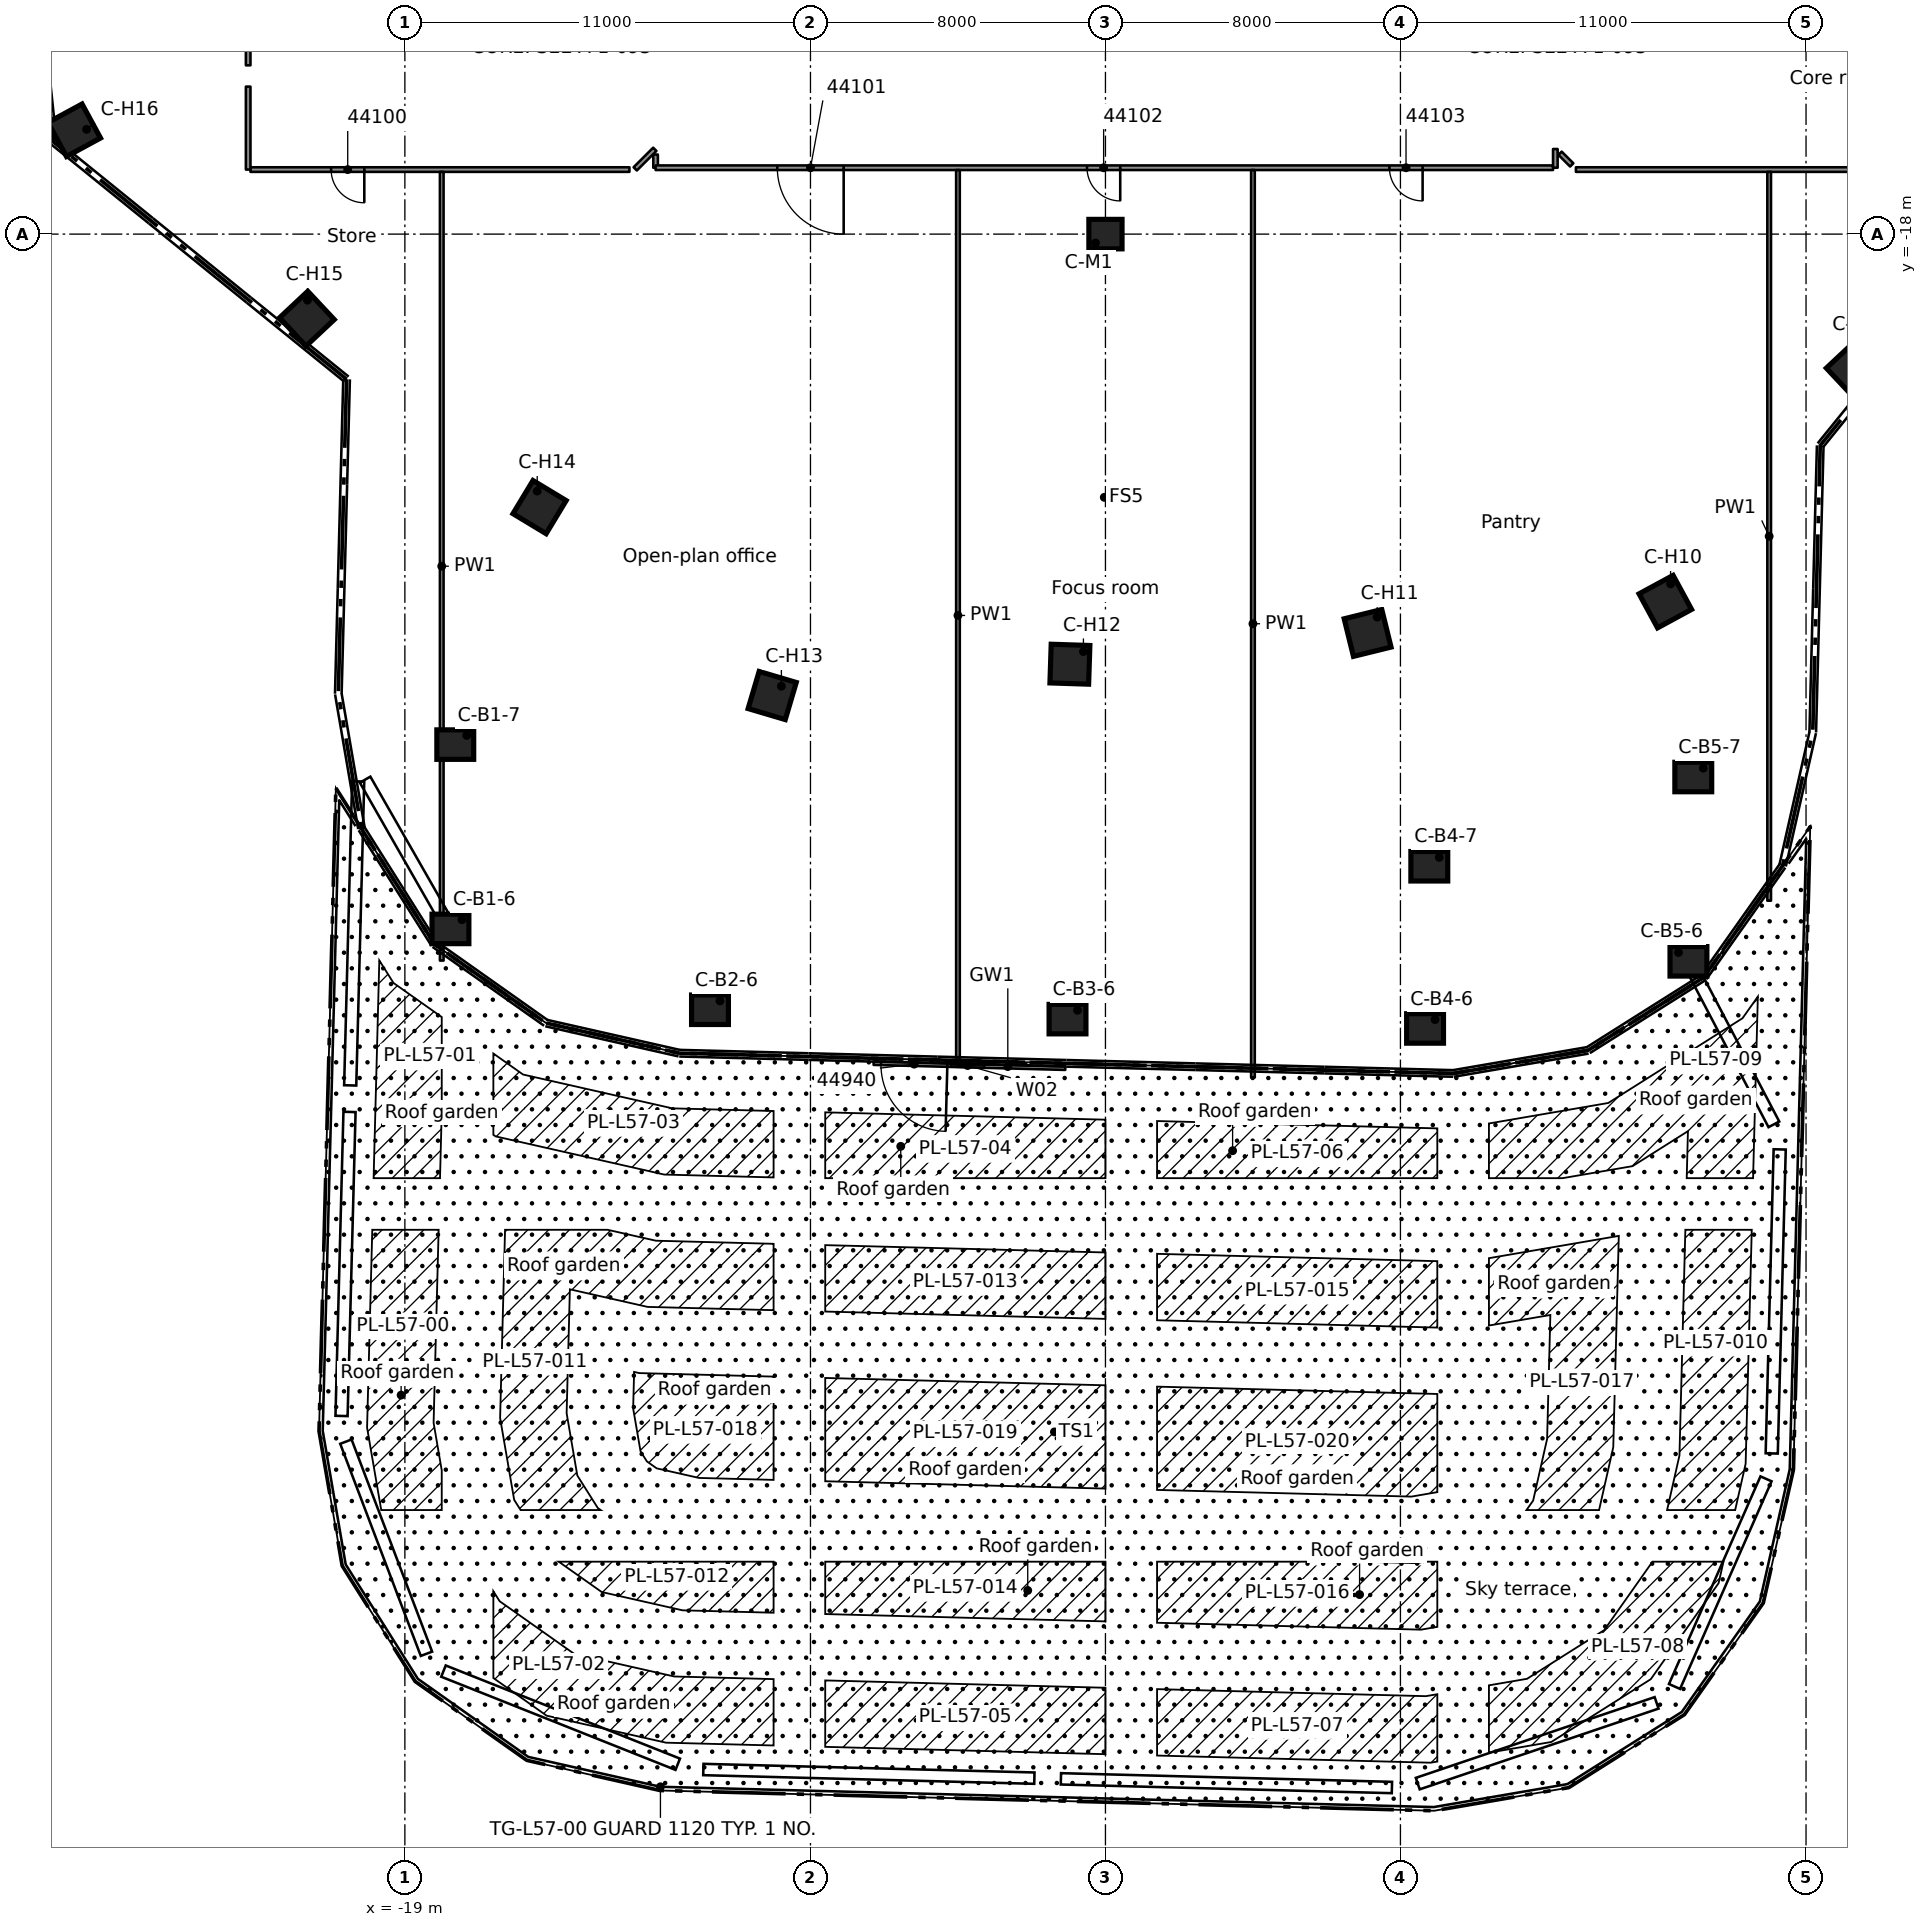
"""IFC4 building model, lengths in metres.
Left out: names, types, materials, properties, quantities, classifications, styles, units other than length and angle.
Written with IfcOpenShell. Run it as: python <this file> out.ifc"""

import sys

from ifc_helpers import new_model, si_unit, direction, frame, frame_2d, origin, origin_2d, place, context, subcontext, project, spatial, rectangle, extrude, element, fill, save


model = new_model("IFC4")
c1 = context("Model", 3, precision=1e-05, world=origin(), true_north=direction((0.0, 1.0)))
c2 = subcontext(c1, "Body", "Model", "MODEL_VIEW")
j1 = project(units=[si_unit("LENGTHUNIT", "METRE"), si_unit("PLANEANGLEUNIT", "RADIAN")], contexts=[c1])
p1 = place(None, origin())
s1 = spatial("IfcSite", under=j1, at=p1, CompositionType="ELEMENT")
p2 = place(p1, origin())
s2 = spatial("IfcBuilding", under=s1, at=p2, CompositionType="ELEMENT")
p3 = place(p2, frame((0.0, 0.0, 217.5)))
s3 = spatial("IfcBuildingStorey", under=s2, at=p3, CompositionType="ELEMENT", Elevation=217.5)
for number, where, z_axis, x_axis in (
    (1, (-17.764, -36.841, 0.0), (0.0, 0.0, 1.0), (1.0, 0.0, 0.0)),
    (2, (-17.633, -31.843, 0.0), (0.0, 0.0, 1.0), (1.0, 0.0, 0.0)),
    (3, (-10.725, -39.033, 0.0), (0.0, 0.0, 1.0), (1.0, 0.0, 0.0)),
    (4, (-1.029, -39.287, 0.0), (0.0, 0.0, 1.0), (1.0, 0.0, 0.0)),
    (5, (8.668, -39.54, 0.0), (0.0, 0.0, 1.0), (1.0, 0.0, 0.0)),
    (6, (8.783, -35.142, 0.0), (0.0, 0.0, 1.0), (1.0, 0.0, 0.0)),
    (7, (15.811, -37.72, 0.0), (0.0, 0.0, 1.0), (1.0, 0.0, 0.0)),
    (8, (15.942, -32.722, 0.0), (0.0, 0.0, 1.0), (1.0, 0.0, 0.0)),
):
    element("IfcColumn", number, at=place(p3, frame(where, z_axis=z_axis, x_axis=x_axis)), inside=s3, PredefinedType="COLUMN", context=c2, shape_type="SweptSolid", body=[
        extrude(rectangle(XDim=1.0, YDim=0.8, at=origin_2d()), origin(), (0.0, 0.0, 1.0), 3.5),
    ])
for number, where, z_axis, x_axis in (
    (9, (20.293, -21.657, 0.0), (0.0, 0.0, 1.0), (0.684, -0.73, 0.0)),
    (10, (15.184, -27.966, 0.0), (0.0, 0.0, 1.0), (0.477, -0.879, 0.0)),
    (11, (7.11, -28.815, 0.0), (0.0, 0.0, 1.0), (0.24, -0.971, 0.0)),
    (12, (-0.964, -29.663, 0.0), (0.0, 0.0, 1.0), (-0.032, -0.999, 0.0)),
    (13, (-9.038, -30.512, 0.0), (0.0, 0.0, 1.0), (-0.284, -0.959, 0.0)),
    (14, (-15.347, -25.403, 0.0), (0.0, 0.0, 1.0), (-0.517, -0.856, 0.0)),
    (15, (-21.657, -20.293, 0.0), (0.0, 0.0, 1.0), (-0.73, -0.684, 0.0)),
    (16, (-27.966, -15.184, 0.0), (0.0, 0.0, 1.0), (-0.879, -0.477, 0.0)),
):
    element("IfcColumn", number, at=place(p3, frame(where, z_axis=z_axis, x_axis=x_axis)), inside=s3, PredefinedType="COLUMN", context=c2, shape_type="SweptSolid", body=[
        extrude(rectangle(XDim=1.05, YDim=1.05, at=origin_2d()), origin(), (0.0, 0.0, 1.0), 3.5),
    ])
p4 = place(p3, frame((0.0, -18.0, 0.0), z_axis=(0.0, 0.0, 1.0), x_axis=(1.0, 0.0, 0.0)))
e17 = element("IfcColumn", 17, at=p4, inside=s3, PredefinedType="COLUMN", context=c2, shape_type="SweptSolid", body=[
    extrude(rectangle(XDim=0.9, YDim=0.8, at=origin_2d()), origin(), (0.0, 0.0, 1.0), 3.5),
])
p5 = place(p3, frame((-1.089, -40.615, 0.0), z_axis=(0.0, 0.0, 1.0), x_axis=(-0.99965677268, 0.026198031146, 0.0)))
e18 = element("IfcWall", 18, at=p5, inside=s3, PredefinedType="STANDARD", context=c2, shape_type="SweptSolid", body=[
    extrude(rectangle(XDim=5.2, YDim=0.1, at=frame_2d((2.6, 0.0))), origin(), (0.0, 0.0, 1.0), 3.08),
])
p6 = place(p5, frame((3.2, 0.0, 0.0)))
e19 = element("IfcOpeningElement", 19, at=p6, cuts=e18, PredefinedType="OPENING", context=c2, shape_type="SweptSolid", body=[
    extrude(rectangle(XDim=1.8, YDim=2.4, at=frame_2d((0.9, 1.2))), frame((0.0, 0.06, 0.0), z_axis=(0.0, -1.0, 0.0), x_axis=(1.0, 0.0, 0.0)), (0.0, 0.0, 1.0), 0.12),
])
p7 = place(p5, frame((2.2, 0.0, 0.0)))
e20 = element("IfcOpeningElement", 20, at=p7, cuts=e18, PredefinedType="OPENING", context=c2, shape_type="SweptSolid", body=[
    extrude(rectangle(XDim=0.9, YDim=2.4, at=frame_2d((0.45, 1.2))), frame((0.0, 0.06, 0.0), z_axis=(0.0, -1.0, 0.0), x_axis=(1.0, 0.0, 0.0)), (0.0, 0.0, 1.0), 0.12),
])
p8 = place(p3, frame((-12.201, -15.842, 0.0), z_axis=(0.0, 0.0, 1.0), x_axis=(0.002728502804, -0.999996277629, 0.0)))
e21 = element("IfcWall", 21, at=p8, inside=s3, PredefinedType="PARTITIONING", context=c2, shape_type="SweptSolid", body=[
    extrude(rectangle(XDim=0.358, YDim=0.125, at=frame_2d((0.179, 0.0))), origin(), (0.0, 0.0, 1.0), 3.06),
])
p9 = place(p3, frame((12.329, -15.807, 0.0), z_axis=(0.0, 0.0, 1.0), x_axis=(0.706834450471, -0.707379007059, 0.0)))
e22 = element("IfcWall", 22, at=p9, inside=s3, PredefinedType="PARTITIONING", context=c2, shape_type="SweptSolid", body=[
    extrude(rectangle(XDim=0.448, YDim=0.125, at=frame_2d((0.224, 0.0))), origin(), (0.0, 0.0, 1.0), 3.06),
])
p10 = place(p3, frame((-12.91, -16.25, 0.0), z_axis=(0.0, 0.0, 1.0), x_axis=(-1.0, 0.0, 0.0)))
e23 = element("IfcWall", 23, at=p10, inside=s3, PredefinedType="PARTITIONING", context=c2, shape_type="SweptSolid", body=[
    extrude(rectangle(XDim=10.278, YDim=0.125, at=frame_2d((5.139, 0.0))), origin(), (0.0, 0.0, 1.0), 3.06),
])
p11 = place(p10, frame((7.19, 0.0, 0.0)))
e24 = element("IfcOpeningElement", 24, at=p11, cuts=e23, PredefinedType="OPENING", context=c2, shape_type="SweptSolid", body=[
    extrude(rectangle(XDim=0.9, YDim=2.1, at=frame_2d((0.45, 1.05))), frame((0.0, 0.073, 0.0), z_axis=(0.0, -1.0, 0.0), x_axis=(1.0, 0.0, 0.0)), (0.0, 0.0, 1.0), 0.145),
])
p12 = place(p3, frame((12.759, -16.25, 0.0), z_axis=(0.0, 0.0, 1.0), x_axis=(1.0, 0.0, 0.0)))
e25 = element("IfcWall", 25, at=p12, inside=s3, PredefinedType="PARTITIONING", context=c2, shape_type="SweptSolid", body=[
    extrude(rectangle(XDim=9.874, YDim=0.125, at=frame_2d((4.937, 0.0))), origin(), (0.0, 0.0, 1.0), 3.06),
])
p13 = place(p3, frame((12.139, -16.2, 0.0), z_axis=(0.0, 0.0, 1.0), x_axis=(-1.0, 0.0, 0.0)))
e26 = element("IfcWall", 26, at=p13, inside=s3, PredefinedType="PARTITIONING", context=c2, shape_type="SweptSolid", body=[
    extrude(rectangle(XDim=24.339, YDim=0.125, at=frame_2d((12.169, 0.0))), origin(), (0.0, 0.0, 1.0), 3.06),
])
p14 = place(p13, frame((19.239, 0.0, 0.0)))
e27 = element("IfcOpeningElement", 27, at=p14, cuts=e26, PredefinedType="OPENING", context=c2, shape_type="SweptSolid", body=[
    extrude(rectangle(XDim=1.8, YDim=2.1, at=frame_2d((0.9, 1.05))), frame((0.0, 0.073, 0.0), z_axis=(0.0, -1.0, 0.0), x_axis=(1.0, 0.0, 0.0)), (0.0, 0.0, 1.0), 0.145),
])
p15 = place(p13, frame((11.739, 0.0, 0.0)))
e28 = element("IfcOpeningElement", 28, at=p15, cuts=e26, PredefinedType="OPENING", context=c2, shape_type="SweptSolid", body=[
    extrude(rectangle(XDim=0.9, YDim=2.1, at=frame_2d((0.45, 1.05))), frame((0.0, 0.073, 0.0), z_axis=(0.0, -1.0, 0.0), x_axis=(1.0, 0.0, 0.0)), (0.0, 0.0, 1.0), 0.145),
])
p16 = place(p13, frame((3.538, 0.0, 0.0)))
e29 = element("IfcOpeningElement", 29, at=p16, cuts=e26, PredefinedType="OPENING", context=c2, shape_type="SweptSolid", body=[
    extrude(rectangle(XDim=0.9, YDim=2.1, at=frame_2d((0.45, 1.05))), frame((0.0, 0.073, 0.0), z_axis=(0.0, -1.0, 0.0), x_axis=(1.0, 0.0, 0.0)), (0.0, 0.0, 1.0), 0.145),
])
p17 = place(p3, frame((-12.753, -16.231, 0.0), z_axis=(0.0, 0.0, 1.0), x_axis=(0.707106781187, 0.707106781187, 0.0)))
e30 = element("IfcWall", 30, at=p17, inside=s3, PredefinedType="PARTITIONING", context=c2, shape_type="SweptSolid", body=[
    extrude(rectangle(XDim=0.751, YDim=0.125, at=frame_2d((0.375, 0.0))), origin(), (0.0, 0.0, 1.0), 3.06),
])
p18 = place(p3, frame((18.0, -36.076, 0.0), z_axis=(0.0, 0.0, 1.0), x_axis=(0.0, 1.0, 0.0)))
e31 = element("IfcWall", 31, at=p18, inside=s3, PredefinedType="PARTITIONING", context=c2, shape_type="SweptSolid", body=[
    extrude(rectangle(XDim=19.764, YDim=0.1, at=frame_2d((9.882, 0.0))), origin(), (0.0, 0.0, 1.0), 3.06),
])
p19 = place(p3, frame((12.201, -16.2, 0.0), z_axis=(0.0, 0.0, 1.0), x_axis=(0.0, 1.0, 0.0)))
e32 = element("IfcWall", 32, at=p19, inside=s3, PredefinedType="PARTITIONING", context=c2, shape_type="SweptSolid", body=[
    extrude(rectangle(XDim=0.508, YDim=0.125, at=frame_2d((0.254, 0.0))), origin(), (0.0, 0.0, 1.0), 3.06),
])
p20 = place(p3, frame((4.0, -40.869, 0.0), z_axis=(0.0, 0.0, 1.0), x_axis=(0.0, 1.0, 0.0)))
e33 = element("IfcWall", 33, at=p20, inside=s3, PredefinedType="PARTITIONING", context=c2, shape_type="SweptSolid", body=[
    extrude(rectangle(XDim=24.607, YDim=0.1, at=frame_2d((12.303, 0.0))), origin(), (0.0, 0.0, 1.0), 3.06),
])
p21 = place(p3, frame((-4.0, -40.419, 0.0), z_axis=(0.0, 0.0, 1.0), x_axis=(0.0, 1.0, 0.0)))
e34 = element("IfcWall", 34, at=p21, inside=s3, PredefinedType="PARTITIONING", context=c2, shape_type="SweptSolid", body=[
    extrude(rectangle(XDim=24.157, YDim=0.1, at=frame_2d((12.079, 0.0))), origin(), (0.0, 0.0, 1.0), 3.06),
])
p22 = place(p3, frame((-18.0, -37.7, 0.0), z_axis=(0.0, 0.0, 1.0), x_axis=(0.0, 1.0, 0.0)))
e35 = element("IfcWall", 35, at=p22, inside=s3, PredefinedType="PARTITIONING", context=c2, shape_type="SweptSolid", body=[
    extrude(rectangle(XDim=21.388, YDim=0.1, at=frame_2d((10.694, 0.0))), origin(), (0.0, 0.0, 1.0), 3.06),
])
p23 = place(p3, frame((-23.25, -16.25, 0.0), z_axis=(0.0, 0.0, 1.0), x_axis=(0.0, 1.0, 0.0)))
e36 = element("IfcWall", 36, at=p23, inside=s3, PredefinedType="PARTITIONING", context=c2, shape_type="SweptSolid", body=[
    extrude(rectangle(XDim=2.25, YDim=0.125, at=frame_2d((1.125, 0.0))), origin(), (0.0, 0.0, 1.0), 3.06),
])
p24 = place(p3, frame((-23.25, -13.423, 0.0), z_axis=(0.0, 0.0, 1.0), x_axis=(0.0, 1.0, 0.0)))
e37 = element("IfcWall", 37, at=p24, inside=s3, PredefinedType="PARTITIONING", context=c2, shape_type="SweptSolid", body=[
    extrude(rectangle(XDim=28.805, YDim=0.125, at=frame_2d((14.403, 0.0))), origin(), (0.0, 0.0, 1.0), 3.06),
])
p25 = place(p24, frame((9.6, 0.0, 0.0)))
e38 = element("IfcOpeningElement", 38, at=p25, cuts=e37, PredefinedType="OPENING", context=c2, shape_type="SweptSolid", body=[
    extrude(rectangle(XDim=1.8, YDim=2.1, at=frame_2d((0.9, 1.05))), frame((0.0, 0.073, 0.0), z_axis=(0.0, -1.0, 0.0), x_axis=(1.0, 0.0, 0.0)), (0.0, 0.0, 1.0), 0.145),
])
p26 = place(p24, frame((23.696, 0.0, 0.0)))
e39 = element("IfcOpeningElement", 39, at=p26, cuts=e37, PredefinedType="OPENING", context=c2, shape_type="SweptSolid", body=[
    extrude(rectangle(XDim=1.1, YDim=2.1, at=frame_2d((0.55, 1.05))), frame((0.0, 0.073, 0.0), z_axis=(0.0, -1.0, 0.0), x_axis=(1.0, 0.0, 0.0)), (0.0, 0.0, 1.0), 0.145),
])
p27 = place(p6, origin())
e40 = element("IfcDoor", 40, at=p27, inside=s3, OperationType="DOUBLE_DOOR_SINGLE_SWING", PredefinedType="DOOR", context=c2, shape_type="SweptSolid", body=[
    extrude(rectangle(XDim=1.8, YDim=2.4, at=frame_2d((0.9, 1.2))), frame((0.0, 0.025, 0.0), z_axis=(0.0, -1.0, 0.0), x_axis=(1.0, 0.0, 0.0)), (0.0, 0.0, 1.0), 0.05),
])
fill(e19, e40)
p28 = place(p7, origin())
e41 = element("IfcWindow", 41, at=p28, inside=s3, PartitioningType="SINGLE_PANEL", PredefinedType="WINDOW", context=c2, shape_type="SweptSolid", body=[
    extrude(rectangle(XDim=0.9, YDim=2.4, at=frame_2d((0.45, 1.2))), frame((0.0, 0.03, 0.0), z_axis=(0.0, -1.0, 0.0), x_axis=(1.0, 0.0, 0.0)), (0.0, 0.0, 1.0), 0.06),
])
fill(e20, e41)
p29 = place(p11, origin())
e42 = element("IfcDoor", 42, at=p29, inside=s3, OperationType="SINGLE_SWING_RIGHT", PredefinedType="DOOR", context=c2, shape_type="SweptSolid", body=[
    extrude(rectangle(XDim=0.9, YDim=2.1, at=frame_2d((0.45, 1.05))), frame((0.0, 0.025, 0.0), z_axis=(0.0, -1.0, 0.0), x_axis=(1.0, 0.0, 0.0)), (0.0, 0.0, 1.0), 0.05),
])
fill(e24, e42)
p30 = place(p14, origin())
e43 = element("IfcDoor", 43, at=p30, inside=s3, OperationType="DOUBLE_DOOR_SINGLE_SWING", PredefinedType="DOOR", context=c2, shape_type="SweptSolid", body=[
    extrude(rectangle(XDim=1.8, YDim=2.1, at=frame_2d((0.9, 1.05))), frame((0.0, 0.025, 0.0), z_axis=(0.0, -1.0, 0.0), x_axis=(1.0, 0.0, 0.0)), (0.0, 0.0, 1.0), 0.05),
])
fill(e27, e43)
p31 = place(p15, origin())
e44 = element("IfcDoor", 44, at=p31, inside=s3, OperationType="SINGLE_SWING_RIGHT", PredefinedType="DOOR", context=c2, shape_type="SweptSolid", body=[
    extrude(rectangle(XDim=0.9, YDim=2.1, at=frame_2d((0.45, 1.05))), frame((0.0, 0.025, 0.0), z_axis=(0.0, -1.0, 0.0), x_axis=(1.0, 0.0, 0.0)), (0.0, 0.0, 1.0), 0.05),
])
fill(e28, e44)
p32 = place(p16, origin())
e45 = element("IfcDoor", 45, at=p32, inside=s3, OperationType="SINGLE_SWING_LEFT", PredefinedType="DOOR", context=c2, shape_type="SweptSolid", body=[
    extrude(rectangle(XDim=0.9, YDim=2.1, at=frame_2d((0.45, 1.05))), frame((0.0, 0.025, 0.0), z_axis=(0.0, -1.0, 0.0), x_axis=(1.0, 0.0, 0.0)), (0.0, 0.0, 1.0), 0.05),
])
fill(e29, e45)
save(model, sys.argv[1])
